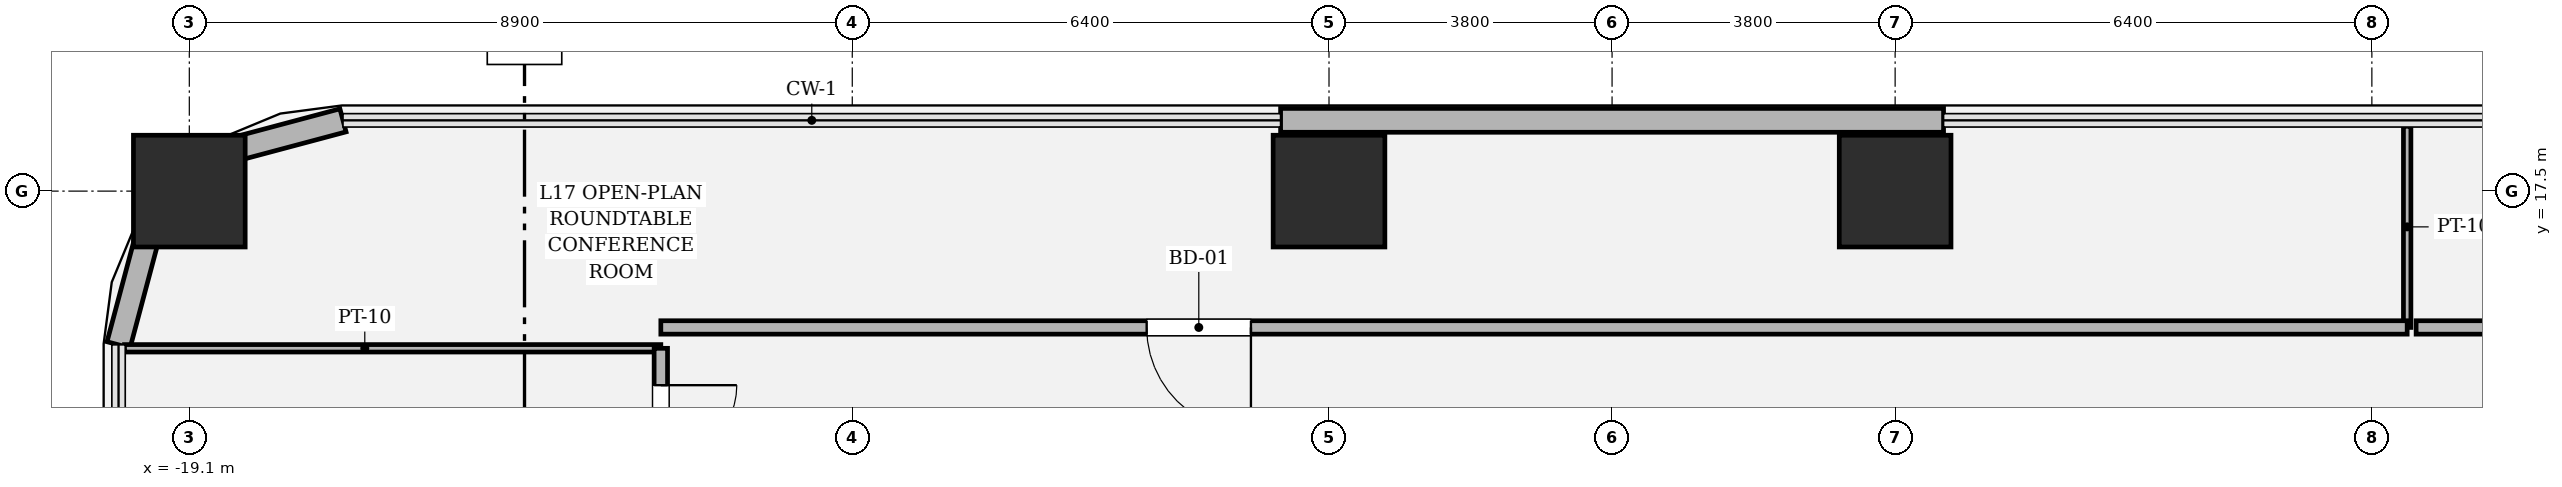
"""IFC4 building model, lengths in metres.
Left out: names, types, materials, properties, quantities, classifications, styles, units other than length and angle.
Written with IfcOpenShell. Run it as: python <this file> out.ifc"""

import sys

from ifc_helpers import new_model, si_unit, direction, frame, frame_2d, origin, origin_2d, place, context, subcontext, project, spatial, rectangle, hollow_rectangle, extrude, element, fill, save


model = new_model("IFC4")
c1 = context("Model", 3, precision=1e-05, world=origin(), true_north=direction((0.0, 1.0)))
c2 = subcontext(c1, "Body", "Model", "MODEL_VIEW")
j1 = project(units=[si_unit("LENGTHUNIT", "METRE"), si_unit("PLANEANGLEUNIT", "RADIAN")], contexts=[c1])
p1 = place(None, origin())
s1 = spatial("IfcSite", under=j1, at=p1, CompositionType="ELEMENT")
p2 = place(p1, origin())
s2 = spatial("IfcBuilding", under=s1, at=p2, CompositionType="ELEMENT")
p3 = place(p2, frame((0.0, 0.0, 76.8)))
s3 = spatial("IfcBuildingStorey", under=s2, at=p3, CompositionType="ELEMENT", Elevation=76.8)
for number, where, z_axis, x_axis in (
    (1, (3.8, 17.5, 0.0), (0.0, 0.0, 1.0), (1.0, 0.0, 0.0)),
    (2, (-3.8, 17.5, 0.0), (0.0, 0.0, 1.0), (1.0, 0.0, 0.0)),
    (3, (-19.1, 17.5, 0.0), (0.0, 0.0, 1.0), (1.0, 0.0, 0.0)),
):
    element("IfcColumn", number, at=place(p3, frame(where, z_axis=z_axis, x_axis=x_axis)), inside=s3, PredefinedType="COLUMN", context=c2, shape_type="SweptSolid", body=[
        extrude(hollow_rectangle(XDim=1.5, YDim=1.5, WallThickness=0.045, at=origin_2d()), origin(), (0.0, 0.0, 1.0), 4.05),
    ])
p4 = place(p3, frame((4.45, 18.45, 0.0), z_axis=(0.0, 0.0, 1.0), x_axis=(-1.0, 0.0, 0.0)))
e4 = element("IfcWall", 4, at=p4, inside=s3, PredefinedType="SOLIDWALL", context=c2, shape_type="SweptSolid", body=[
    extrude(rectangle(XDim=8.9, YDim=0.32, at=frame_2d((4.45, 0.0))), origin(), (0.0, 0.0, 1.0), 3.81),
])
p5 = place(p3, frame((-17.037, 18.45, 0.0), z_axis=(0.0, 0.0, 1.0), x_axis=(-0.966224582397, -0.257701486942, 0.0)))
e5 = element("IfcWall", 5, at=p5, inside=s3, PredefinedType="SOLIDWALL", context=c2, shape_type="SweptSolid", body=[
    extrude(rectangle(XDim=1.565, YDim=0.32, at=frame_2d((0.783, 0.0))), origin(), (0.0, 0.0, 1.0), 3.81),
])
p6 = place(p3, frame((-18.549, 18.047, 0.0), z_axis=(0.0, 0.0, 1.0), x_axis=(-0.707106781187, -0.707106781187, 0.0)))
e6 = element("IfcWall", 6, at=p6, inside=s3, PredefinedType="SOLIDWALL", context=c2, shape_type="SweptSolid", body=[
    extrude(rectangle(XDim=1.552, YDim=0.32, at=frame_2d((0.776, 0.0))), origin(), (0.0, 0.0, 1.0), 3.104),
])
p7 = place(p3, frame((-19.646, 16.949, 0.0), z_axis=(0.0, 0.0, 1.0), x_axis=(-0.257847112249, -0.966185730957, 0.0)))
e7 = element("IfcWall", 7, at=p7, inside=s3, PredefinedType="SOLIDWALL", context=c2, shape_type="SweptSolid", body=[
    extrude(rectangle(XDim=1.565, YDim=0.32, at=frame_2d((0.783, 0.0))), origin(), (0.0, 0.0, 1.0), 3.81),
])
p8 = place(p3, frame((-19.97, 15.39, 0.0), z_axis=(0.0, 0.0, 1.0), x_axis=(1.0, 0.0, 0.0)))
e8 = element("IfcWall", 8, at=p8, inside=s3, PredefinedType="PARTITIONING", context=c2, shape_type="SweptSolid", body=[
    extrude(rectangle(XDim=7.2, YDim=0.1, at=frame_2d((3.6, 0.0))), origin(), (0.0, 0.0, 1.0), 3.104),
])
p9 = place(p3, frame((-12.77, 15.39, 0.0), z_axis=(0.0, 0.0, 1.0), x_axis=(0.0, -1.0, 0.0)))
e9 = element("IfcWall", 9, at=p9, inside=s3, PredefinedType="PARTITIONING", context=c2, shape_type="SweptSolid", body=[
    extrude(rectangle(XDim=2.01, YDim=0.18, at=frame_2d((1.005, 0.0))), origin(), (0.0, 0.0, 1.0), 3.354),
])
p10 = place(p9, frame((0.495, 0.0, 0.0)))
e10 = element("IfcOpeningElement", 10, at=p10, cuts=e9, PredefinedType="OPENING", context=c2, shape_type="SweptSolid", body=[
    extrude(rectangle(XDim=1.02, YDim=2.2, at=frame_2d((0.51, 1.1))), frame((0.0, 0.1, 0.0), z_axis=(0.0, -1.0, 0.0), x_axis=(1.0, 0.0, 0.0)), (0.0, 0.0, 1.0), 0.2),
])
p11 = place(p3, frame((10.674, 18.37, 0.0), z_axis=(0.0, 0.0, 1.0), x_axis=(0.0, -1.0, 0.0)))
e11 = element("IfcWall", 11, at=p11, inside=s3, PredefinedType="PARTITIONING", context=c2, shape_type="SweptSolid", body=[
    extrude(rectangle(XDim=2.7, YDim=0.1, at=frame_2d((1.35, 0.0))), origin(), (0.0, 0.0, 1.0), 3.104),
])
p12 = place(p3, frame((10.674, 15.67, 0.0), z_axis=(0.0, 0.0, 1.0), x_axis=(-1.0, 0.0, 0.0)))
e12 = element("IfcWall", 12, at=p12, inside=s3, PredefinedType="PARTITIONING", context=c2, shape_type="SweptSolid", body=[
    extrude(rectangle(XDim=23.444, YDim=0.18, at=frame_2d((11.722, 0.0))), origin(), (0.0, 0.0, 1.0), 3.104),
])
p13 = place(p12, frame((15.522, 0.0, 0.0)))
e13 = element("IfcOpeningElement", 13, at=p13, cuts=e12, PredefinedType="OPENING", context=c2, shape_type="SweptSolid", body=[
    extrude(rectangle(XDim=1.4, YDim=2.25, at=frame_2d((0.7, 1.125))), frame((0.0, 0.1, 0.0), z_axis=(0.0, -1.0, 0.0), x_axis=(1.0, 0.0, 0.0)), (0.0, 0.0, 1.0), 0.2),
])
p14 = place(p3, frame((14.42, 15.67, 0.0), z_axis=(0.0, 0.0, 1.0), x_axis=(-1.0, 0.0, 0.0)))
e14 = element("IfcWall", 14, at=p14, inside=s3, PredefinedType="PARTITIONING", context=c2, shape_type="SweptSolid", body=[
    extrude(rectangle(XDim=3.626, YDim=0.18, at=frame_2d((1.813, 0.0))), origin(), (0.0, 0.0, 1.0), 3.81),
])
p15 = place(p14, frame((1.303, 0.0, 0.0)))
e15 = element("IfcOpeningElement", 15, at=p15, cuts=e14, PredefinedType="OPENING", context=c2, shape_type="SweptSolid", body=[
    extrude(rectangle(XDim=1.02, YDim=2.2, at=frame_2d((0.51, 1.1))), frame((0.0, 0.1, 0.0), z_axis=(0.0, -1.0, 0.0), x_axis=(1.0, 0.0, 0.0)), (0.0, 0.0, 1.0), 0.2),
])
p16 = place(p10, origin())
e16 = element("IfcDoor", 16, at=p16, inside=s3, OperationType="SINGLE_SWING_LEFT", PredefinedType="DOOR", context=c2, shape_type="SweptSolid", body=[
    extrude(rectangle(XDim=1.02, YDim=2.2, at=frame_2d((0.51, 1.1))), frame((0.0, 0.025, 0.0), z_axis=(0.0, -1.0, 0.0), x_axis=(1.0, 0.0, 0.0)), (0.0, 0.0, 1.0), 0.05),
])
fill(e10, e16)
p17 = place(p13, origin())
e17 = element("IfcDoor", 17, at=p17, inside=s3, OperationType="SINGLE_SWING_LEFT", PredefinedType="DOOR", context=c2, shape_type="SweptSolid", body=[
    extrude(rectangle(XDim=1.4, YDim=2.25, at=frame_2d((0.7, 1.125))), frame((0.0, 0.025, 0.0), z_axis=(0.0, -1.0, 0.0), x_axis=(1.0, 0.0, 0.0)), (0.0, 0.0, 1.0), 0.05),
])
fill(e13, e17)
save(model, sys.argv[1])
